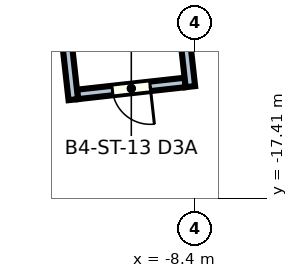
"""IFC4 building model, lengths in metres.
Left out: names, types, materials, properties, quantities, classifications, styles, units other than length and angle.
Written with IfcOpenShell. Run it as: python <this file> out.ifc"""

import sys

from ifc_helpers import new_model, si_unit, direction, frame, frame_2d, origin, place, context, subcontext, project, spatial, rectangle, extrude, element, fill, save


model = new_model("IFC4")
c1 = context("Model", 3, precision=1e-05, world=origin(), true_north=direction((0.0, 1.0)))
c2 = subcontext(c1, "Body", "Model", "MODEL_VIEW")
j1 = project(units=[si_unit("LENGTHUNIT", "METRE"), si_unit("PLANEANGLEUNIT", "RADIAN")], contexts=[c1])
p1 = place(None, origin())
s1 = spatial("IfcSite", under=j1, at=p1, CompositionType="ELEMENT")
p2 = place(p1, origin())
s2 = spatial("IfcBuilding", under=s1, at=p2, CompositionType="ELEMENT")
p3 = place(p2, frame((0.0, 0.0, -17.0)))
s3 = spatial("IfcBuildingStorey", under=s2, at=p3, CompositionType="ELEMENT", Elevation=-17.0)
p4 = place(p3, frame((-8.667, -14.3, 0.0), z_axis=(0.0, 0.0, 1.0), x_axis=(-0.993904609394, -0.110243491536, 0.0)))
e1 = element("IfcWall", 1, at=p4, inside=s3, PredefinedType="SOLIDWALL", context=c2, shape_type="SweptSolid", body=[
    extrude(rectangle(XDim=2.85, YDim=0.25, at=frame_2d((1.425, 0.0))), origin(), (0.0, 0.0, 1.0), 3.7),
])
p5 = place(p4, frame((0.925, 0.0, 0.0)))
e2 = element("IfcOpeningElement", 2, at=p5, cuts=e1, PredefinedType="OPENING", context=c2, shape_type="SweptSolid", body=[
    extrude(rectangle(XDim=1.0, YDim=2.1, at=frame_2d((0.5, 1.05))), frame((0.0, 0.135, 0.0), z_axis=(0.0, -1.0, 0.0), x_axis=(1.0, 0.0, 0.0)), (0.0, 0.0, 1.0), 0.27),
])
p6 = place(p3, frame((-11.61, -14.753, 0.0), z_axis=(0.0, 0.0, 1.0), x_axis=(-0.110310943534, 0.993897125329, 0.0)))
e3 = element("IfcWall", 3, at=p6, inside=s3, PredefinedType="SOLIDWALL", context=c2, shape_type="SweptSolid", body=[
    extrude(rectangle(XDim=6.0, YDim=0.25, at=frame_2d((3.0, 0.0))), origin(), (0.0, 0.0, 1.0), 3.7),
])
p7 = place(p3, frame((-9.22, -8.178, 0.0), z_axis=(0.0, 0.0, 1.0), x_axis=(0.110299055694, -0.993898444668, 0.0)))
e4 = element("IfcWall", 4, at=p7, inside=s3, PredefinedType="SOLIDWALL", context=c2, shape_type="SweptSolid", body=[
    extrude(rectangle(XDim=6.271, YDim=0.25, at=frame_2d((3.135, 0.0))), origin(), (0.0, 0.0, 1.0), 3.7),
])
p8 = place(p5, origin())
e5 = element("IfcDoor", 5, at=p8, inside=s3, PredefinedType="DOOR", context=c2, shape_type="SweptSolid", body=[
    extrude(rectangle(XDim=1.0, YDim=2.1, at=frame_2d((0.5, 1.05))), frame((0.0, 0.025, 0.0), z_axis=(0.0, -1.0, 0.0), x_axis=(1.0, 0.0, 0.0)), (0.0, 0.0, 1.0), 0.05),
])
fill(e2, e5)
save(model, sys.argv[1])
